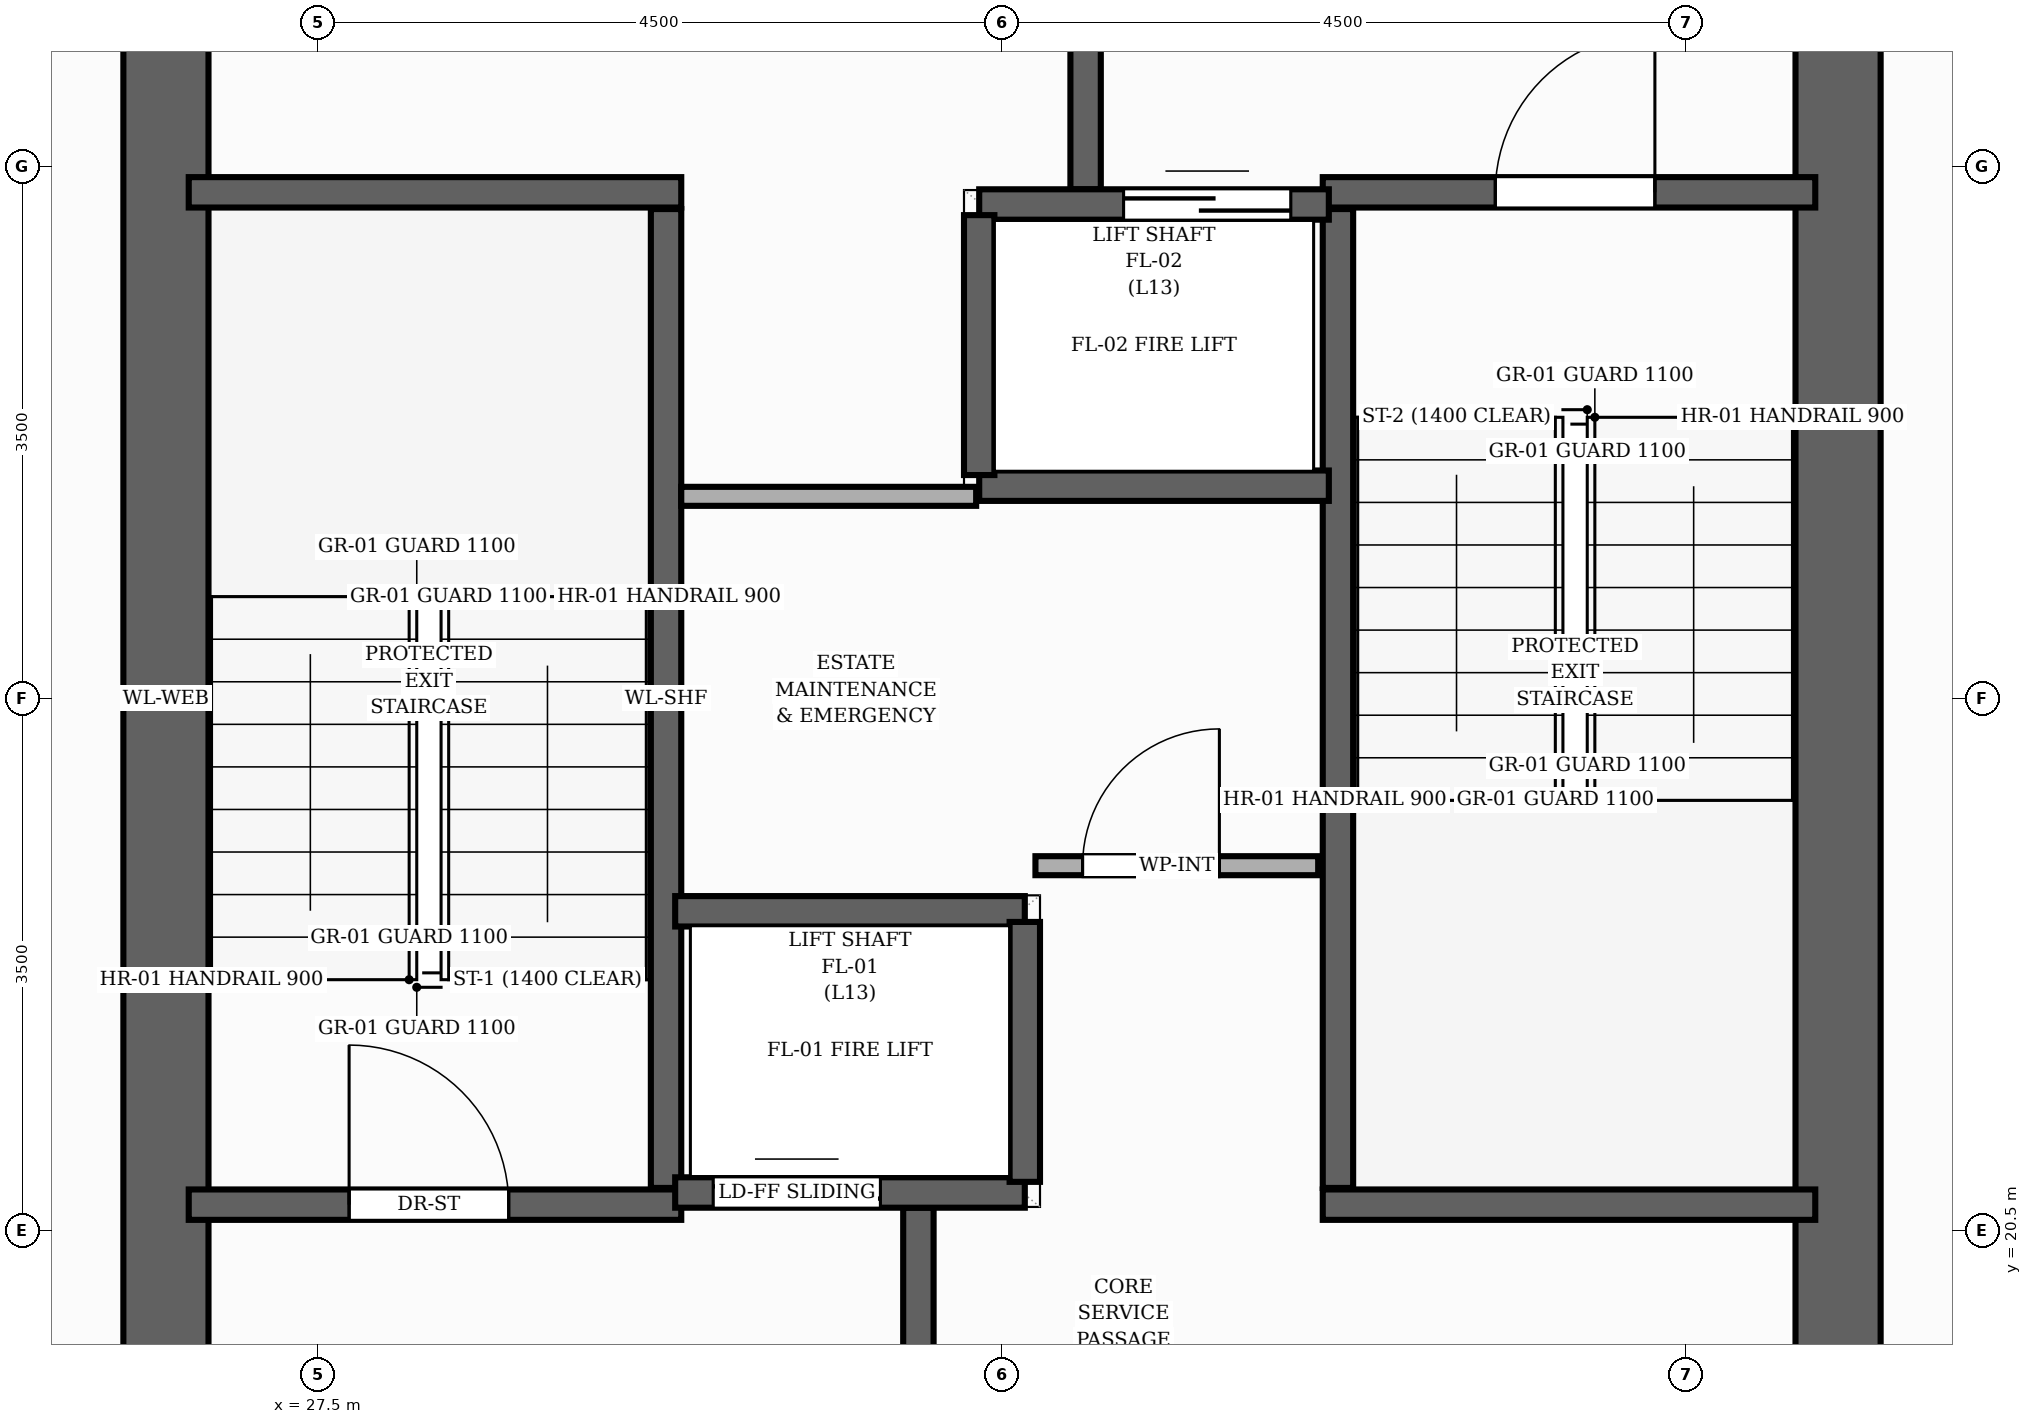
"""IFC4 building model, lengths in metres.
Left out: names, types, materials, properties, quantities, classifications, styles, units other than length and angle.
Written with IfcOpenShell. Run it as: python <this file> out.ifc"""

import sys

from ifc_helpers import new_model, si_unit, direction, frame, frame_2d, origin, place, context, subcontext, project, spatial, rectangle, extrude, element, fill, save


model = new_model("IFC4")
c1 = context("Model", 3, precision=1e-05, world=origin(), true_north=direction((0.0, 1.0)))
c2 = subcontext(c1, "Body", "Model", "MODEL_VIEW")
j1 = project(units=[si_unit("LENGTHUNIT", "METRE"), si_unit("PLANEANGLEUNIT", "RADIAN")], contexts=[c1])
p1 = place(None, origin())
s1 = spatial("IfcSite", under=j1, at=p1, CompositionType="ELEMENT")
p2 = place(p1, origin())
s2 = spatial("IfcBuilding", under=s1, at=p2, CompositionType="ELEMENT")
p3 = place(p2, frame((0.0, 0.0, 47.2)))
s3 = spatial("IfcBuildingStorey", under=s2, at=p3, CompositionType="ELEMENT", Elevation=47.2)
for number, where, z_axis, x_axis in (
    (1, (26.5, 17.4, 0.0), (0.0, 0.0, 1.0), (0.0, 1.0, 0.0)),
    (2, (37.5, 17.4, 0.0), (0.0, 0.0, 1.0), (0.0, 1.0, 0.0)),
):
    element("IfcWall", number, at=place(p3, frame(where, z_axis=z_axis, x_axis=x_axis)), inside=s3, PredefinedType="SHEAR", context=c2, shape_type="SweptSolid", body=[
        extrude(rectangle(XDim=13.2, YDim=0.56, at=frame_2d((6.6, 0.0))), origin(), (0.0, 0.0, 1.0), 3.2),
    ])
p4 = place(p3, frame((29.79, 20.78, 0.0), z_axis=(0.0, 0.0, 1.0), x_axis=(0.0, 1.0, 0.0)))
e3 = element("IfcWall", 3, at=p4, inside=s3, PredefinedType="SHEAR", context=c2, shape_type="SweptSolid", body=[
    extrude(rectangle(XDim=6.44, YDim=0.2, at=frame_2d((3.22, 0.0))), origin(), (0.0, 0.0, 1.0), 3.2),
])
p5 = place(p3, frame((26.65, 27.33, 0.0), z_axis=(0.0, 0.0, 1.0), x_axis=(1.0, 0.0, 0.0)))
e4 = element("IfcWall", 4, at=p5, inside=s3, PredefinedType="SHEAR", context=c2, shape_type="SweptSolid", body=[
    extrude(rectangle(XDim=3.24, YDim=0.2, at=frame_2d((1.62, 0.0))), origin(), (0.0, 0.0, 1.0), 3.2),
])
p6 = place(p3, frame((26.65, 20.67, 0.0), z_axis=(0.0, 0.0, 1.0), x_axis=(1.0, 0.0, 0.0)))
e5 = element("IfcWall", 5, at=p6, inside=s3, PredefinedType="SHEAR", context=c2, shape_type="SweptSolid", body=[
    extrude(rectangle(XDim=3.24, YDim=0.2, at=frame_2d((1.62, 0.0))), origin(), (0.0, 0.0, 1.0), 3.2),
])
p7 = place(p6, frame((1.055, 0.0, 0.0)))
e6 = element("IfcOpeningElement", 6, at=p7, cuts=e5, PredefinedType="OPENING", context=c2, shape_type="SweptSolid", body=[
    extrude(rectangle(XDim=1.05, YDim=2.15, at=frame_2d((0.525, 1.075))), frame((0.0, 0.11, 0.0), z_axis=(0.0, -1.0, 0.0), x_axis=(1.0, 0.0, 0.0)), (0.0, 0.0, 1.0), 0.22),
])
p8 = place(p3, frame((34.21, 20.78, 0.0), z_axis=(0.0, 0.0, 1.0), x_axis=(0.0, 1.0, 0.0)))
e7 = element("IfcWall", 7, at=p8, inside=s3, PredefinedType="SHEAR", context=c2, shape_type="SweptSolid", body=[
    extrude(rectangle(XDim=6.44, YDim=0.2, at=frame_2d((3.22, 0.0))), origin(), (0.0, 0.0, 1.0), 3.2),
])
p9 = place(p3, frame((34.11, 20.67, 0.0), z_axis=(0.0, 0.0, 1.0), x_axis=(1.0, 0.0, 0.0)))
e8 = element("IfcWall", 8, at=p9, inside=s3, PredefinedType="SHEAR", context=c2, shape_type="SweptSolid", body=[
    extrude(rectangle(XDim=3.24, YDim=0.2, at=frame_2d((1.62, 0.0))), origin(), (0.0, 0.0, 1.0), 3.2),
])
p10 = place(p3, frame((34.11, 27.33, 0.0), z_axis=(0.0, 0.0, 1.0), x_axis=(1.0, 0.0, 0.0)))
e9 = element("IfcWall", 9, at=p10, inside=s3, PredefinedType="SHEAR", context=c2, shape_type="SweptSolid", body=[
    extrude(rectangle(XDim=3.24, YDim=0.2, at=frame_2d((1.62, 0.0))), origin(), (0.0, 0.0, 1.0), 3.2),
])
p11 = place(p10, frame((1.135, 0.0, 0.0)))
e10 = element("IfcOpeningElement", 10, at=p11, cuts=e9, PredefinedType="OPENING", context=c2, shape_type="SweptSolid", body=[
    extrude(rectangle(XDim=1.05, YDim=2.15, at=frame_2d((0.525, 1.075))), frame((0.0, 0.11, 0.0), z_axis=(0.0, -1.0, 0.0), x_axis=(1.0, 0.0, 0.0)), (0.0, 0.0, 1.0), 0.22),
])
for number, where, z_axis, x_axis in (
    (11, (31.45, 17.15, 0.0), (0.0, 0.0, 1.0), (0.0, 1.0, 0.0)),
    (12, (32.55, 27.35, 0.0), (0.0, 0.0, 1.0), (0.0, 1.0, 0.0)),
):
    element("IfcWall", number, at=place(p3, frame(where, z_axis=z_axis, x_axis=x_axis)), inside=s3, PredefinedType="SHEAR", context=c2, shape_type="SweptSolid", body=[
        extrude(rectangle(XDim=3.5, YDim=0.2, at=frame_2d((1.75, 0.0))), origin(), (0.0, 0.0, 1.0), 3.2),
    ])
p12 = place(p3, frame((29.85, 20.75, 0.0), z_axis=(0.0, 0.0, 1.0), x_axis=(1.0, 0.0, 0.0)))
e13 = element("IfcWall", 13, at=p12, inside=s3, PredefinedType="SHEAR", context=c2, shape_type="SweptSolid", body=[
    extrude(rectangle(XDim=2.3, YDim=0.2, at=frame_2d((1.15, 0.0))), origin(), (0.0, 0.0, 1.0), 3.2),
])
p13 = place(p12, frame((0.25, 0.0, 0.0)))
e14 = element("IfcOpeningElement", 14, at=p13, cuts=e13, PredefinedType="OPENING", context=c2, shape_type="SweptSolid", body=[
    extrude(rectangle(XDim=1.1, YDim=2.15, at=frame_2d((0.55, 1.075))), frame((0.0, 0.11, 0.0), z_axis=(0.0, -1.0, 0.0), x_axis=(1.0, 0.0, 0.0)), (0.0, 0.0, 1.0), 0.22),
])
p14 = place(p3, frame((29.85, 22.6, 0.0), z_axis=(0.0, 0.0, 1.0), x_axis=(1.0, 0.0, 0.0)))
e15 = element("IfcWall", 15, at=p14, inside=s3, PredefinedType="SHEAR", context=c2, shape_type="SweptSolid", body=[
    extrude(rectangle(XDim=2.3, YDim=0.2, at=frame_2d((1.15, 0.0))), origin(), (0.0, 0.0, 1.0), 3.2),
])
p15 = place(p3, frame((32.15, 20.82, 0.0), z_axis=(0.0, 0.0, 1.0), x_axis=(0.0, 1.0, 0.0)))
e16 = element("IfcWall", 16, at=p15, inside=s3, PredefinedType="SHEAR", context=c2, shape_type="SweptSolid", body=[
    extrude(rectangle(XDim=1.71, YDim=0.2, at=frame_2d((0.855, 0.0))), origin(), (0.0, 0.0, 1.0), 3.2),
])
p16 = place(p3, frame((31.85, 27.25, 0.0), z_axis=(0.0, 0.0, 1.0), x_axis=(1.0, 0.0, 0.0)))
e17 = element("IfcWall", 17, at=p16, inside=s3, PredefinedType="SHEAR", context=c2, shape_type="SweptSolid", body=[
    extrude(rectangle(XDim=2.3, YDim=0.2, at=frame_2d((1.15, 0.0))), origin(), (0.0, 0.0, 1.0), 3.2),
])
p17 = place(p16, frame((0.95, 0.0, 0.0)))
e18 = element("IfcOpeningElement", 18, at=p17, cuts=e17, PredefinedType="OPENING", context=c2, shape_type="SweptSolid", body=[
    extrude(rectangle(XDim=1.1, YDim=2.15, at=frame_2d((0.55, 1.075))), frame((0.0, 0.11, 0.0), z_axis=(0.0, -1.0, 0.0), x_axis=(1.0, 0.0, 0.0)), (0.0, 0.0, 1.0), 0.22),
])
p18 = place(p3, frame((31.85, 25.4, 0.0), z_axis=(0.0, 0.0, 1.0), x_axis=(1.0, 0.0, 0.0)))
e19 = element("IfcWall", 19, at=p18, inside=s3, PredefinedType="SHEAR", context=c2, shape_type="SweptSolid", body=[
    extrude(rectangle(XDim=2.3, YDim=0.2, at=frame_2d((1.15, 0.0))), origin(), (0.0, 0.0, 1.0), 3.2),
])
p19 = place(p3, frame((31.85, 25.47, 0.0), z_axis=(0.0, 0.0, 1.0), x_axis=(0.0, 1.0, 0.0)))
e20 = element("IfcWall", 20, at=p19, inside=s3, PredefinedType="SHEAR", context=c2, shape_type="SweptSolid", body=[
    extrude(rectangle(XDim=1.71, YDim=0.2, at=frame_2d((0.855, 0.0))), origin(), (0.0, 0.0, 1.0), 3.2),
])
p20 = place(p3, frame((32.22, 22.9, 0.0), z_axis=(0.0, 0.0, 1.0), x_axis=(1.0, 0.0, 0.0)))
e21 = element("IfcWall", 21, at=p20, inside=s3, PredefinedType="PARTITIONING", context=c2, shape_type="SweptSolid", body=[
    extrude(rectangle(XDim=1.86, YDim=0.125, at=frame_2d((0.93, 0.0))), origin(), (0.0, 0.0, 1.0), 2.955),
])
p21 = place(p20, frame((0.31, 0.0, 0.0)))
e22 = element("IfcOpeningElement", 22, at=p21, cuts=e21, PredefinedType="OPENING", context=c2, shape_type="SweptSolid", body=[
    extrude(rectangle(XDim=0.9, YDim=2.1, at=frame_2d((0.45, 1.05))), frame((0.0, 0.073, 0.0), z_axis=(0.0, -1.0, 0.0), x_axis=(1.0, 0.0, 0.0)), (0.0, 0.0, 1.0), 0.145),
])
p22 = place(p3, frame((29.89, 25.33, 0.0), z_axis=(0.0, 0.0, 1.0), x_axis=(1.0, 0.0, 0.0)))
e23 = element("IfcWall", 23, at=p22, inside=s3, PredefinedType="PARTITIONING", context=c2, shape_type="SweptSolid", body=[
    extrude(rectangle(XDim=1.94, YDim=0.125, at=frame_2d((0.97, 0.0))), origin(), (0.0, 0.0, 1.0), 2.955),
])
p23 = place(p7, origin())
e24 = element("IfcDoor", 24, at=p23, inside=s3, OperationType="SINGLE_SWING_LEFT", PredefinedType="DOOR", context=c2, shape_type="SweptSolid", body=[
    extrude(rectangle(XDim=1.05, YDim=2.15, at=frame_2d((0.525, 1.075))), frame((0.0, 0.025, 0.0), z_axis=(0.0, -1.0, 0.0), x_axis=(1.0, 0.0, 0.0)), (0.0, 0.0, 1.0), 0.05),
])
fill(e6, e24)
p24 = place(p11, origin())
e25 = element("IfcDoor", 25, at=p24, inside=s3, OperationType="SINGLE_SWING_RIGHT", PredefinedType="DOOR", context=c2, shape_type="SweptSolid", body=[
    extrude(rectangle(XDim=1.05, YDim=2.15, at=frame_2d((0.525, 1.075))), frame((0.0, 0.025, 0.0), z_axis=(0.0, -1.0, 0.0), x_axis=(1.0, 0.0, 0.0)), (0.0, 0.0, 1.0), 0.05),
])
fill(e10, e25)
p25 = place(p13, origin())
e26 = element("IfcDoor", 26, at=p25, inside=s3, OperationType="DOUBLE_DOOR_SLIDING", PredefinedType="DOOR", context=c2, shape_type="SweptSolid", body=[
    extrude(rectangle(XDim=1.1, YDim=2.15, at=frame_2d((0.55, 1.075))), frame((0.0, 0.025, 0.0), z_axis=(0.0, -1.0, 0.0), x_axis=(1.0, 0.0, 0.0)), (0.0, 0.0, 1.0), 0.05),
])
fill(e14, e26)
p26 = place(p17, origin())
e27 = element("IfcDoor", 27, at=p26, inside=s3, OperationType="DOUBLE_DOOR_SLIDING", PredefinedType="DOOR", context=c2, shape_type="SweptSolid", body=[
    extrude(rectangle(XDim=1.1, YDim=2.15, at=frame_2d((0.55, 1.075))), frame((0.0, 0.025, 0.0), z_axis=(0.0, -1.0, 0.0), x_axis=(1.0, 0.0, 0.0)), (0.0, 0.0, 1.0), 0.05),
])
fill(e18, e27)
p27 = place(p21, origin())
e28 = element("IfcDoor", 28, at=p27, inside=s3, OperationType="SINGLE_SWING_RIGHT", PredefinedType="DOOR", context=c2, shape_type="SweptSolid", body=[
    extrude(rectangle(XDim=0.9, YDim=2.1, at=frame_2d((0.45, 1.05))), frame((0.0, 0.025, 0.0), z_axis=(0.0, -1.0, 0.0), x_axis=(1.0, 0.0, 0.0)), (0.0, 0.0, 1.0), 0.05),
])
fill(e22, e28)
save(model, sys.argv[1])
